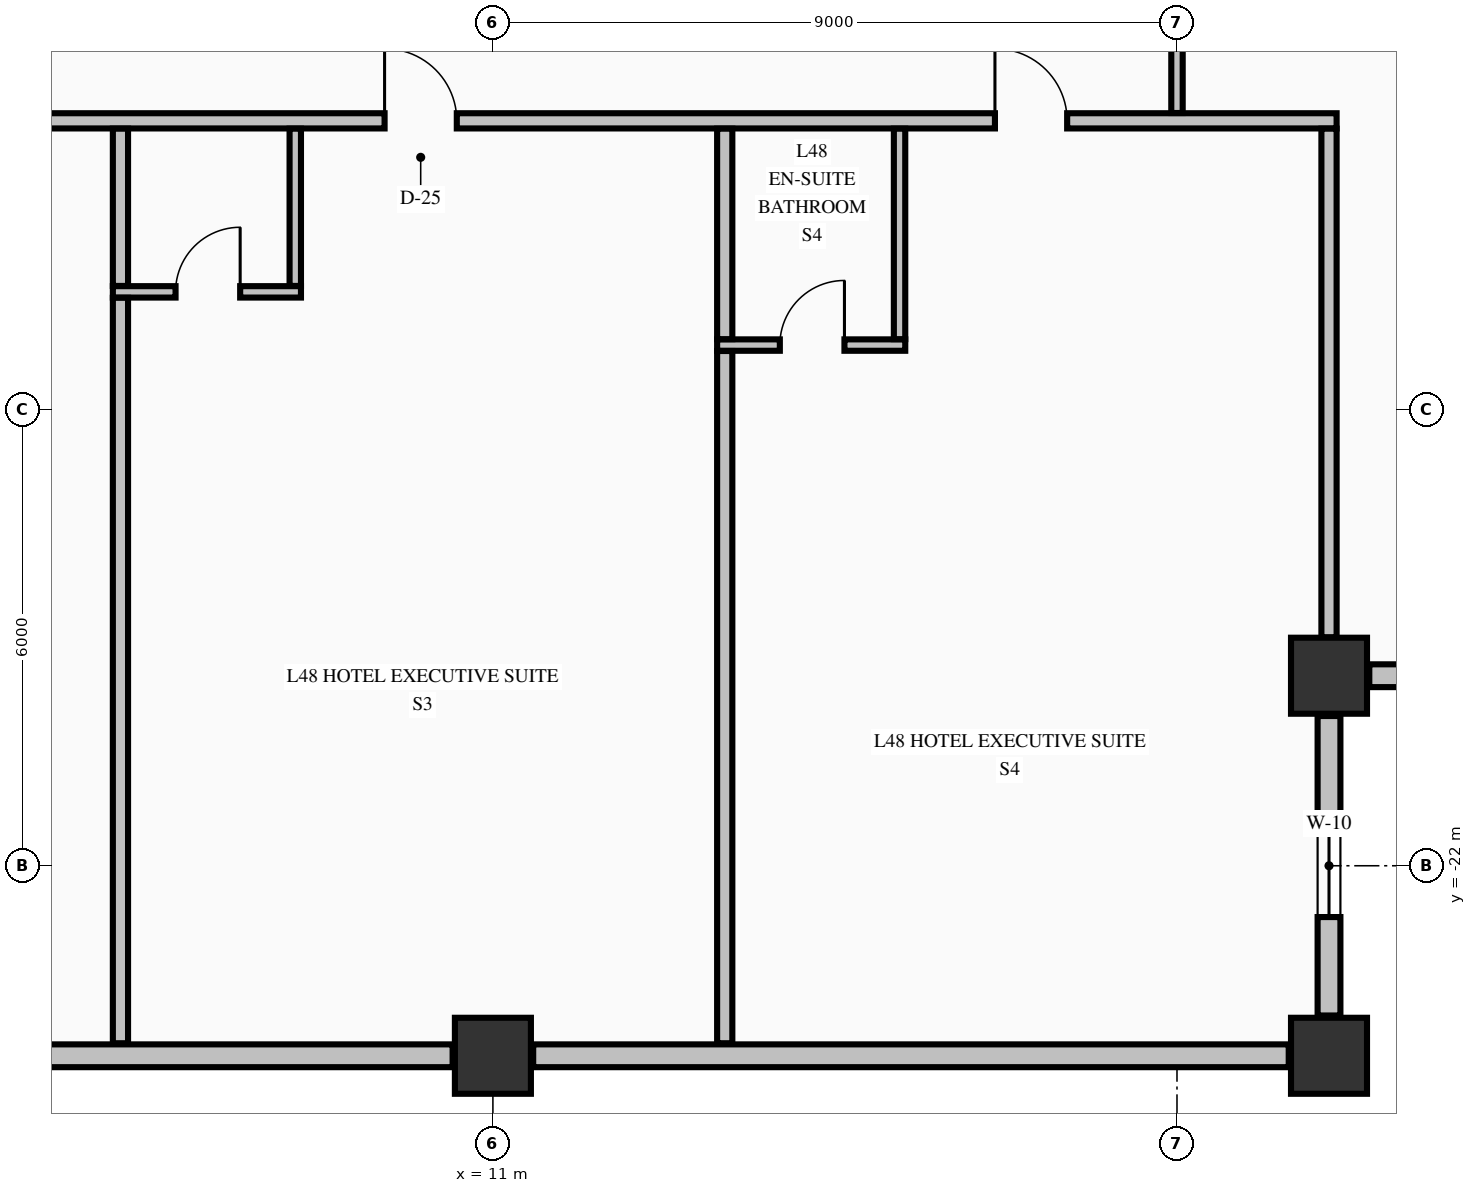
"""IFC4 building model, lengths in metres.
Left out: names, types, materials, properties, quantities, classifications, styles, units other than length and angle.
Written with IfcOpenShell. Run it as: python <this file> out.ifc"""

import sys

from ifc_helpers import new_model, si_unit, direction, frame, frame_2d, origin, origin_2d, place, context, subcontext, project, spatial, rectangle, extrude, element, fill, save


model = new_model("IFC4")
c1 = context("Model", 3, precision=1e-05, world=origin(), true_north=direction((0.0, 1.0)))
c2 = subcontext(c1, "Body", "Model", "MODEL_VIEW")
j1 = project(units=[si_unit("LENGTHUNIT", "METRE"), si_unit("PLANEANGLEUNIT", "RADIAN")], contexts=[c1])
p1 = place(None, origin())
s1 = spatial("IfcSite", under=j1, at=p1, CompositionType="ELEMENT")
p2 = place(p1, origin())
s2 = spatial("IfcBuilding", under=s1, at=p2, CompositionType="ELEMENT")
p3 = place(p2, frame((0.0, 0.0, 186.46)))
s3 = spatial("IfcBuildingStorey", under=s2, at=p3, CompositionType="ELEMENT", Elevation=186.46)
for number, where, z_axis, x_axis in (
    (1, (11.0, -24.5, -0.425), (0.0, 0.0, 1.0), (1.0, 0.0, 0.0)),
    (2, (22.0, -24.5, -0.425), (0.0, 0.0, 1.0), (1.0, 0.0, 0.0)),
    (3, (22.0, -19.5, -0.425), (0.0, 0.0, 1.0), (1.0, 0.0, 0.0)),
):
    element("IfcColumn", number, at=place(p3, frame(where, z_axis=z_axis, x_axis=x_axis)), inside=s3, PredefinedType="COLUMN", context=c2, shape_type="SweptSolid", body=[
        extrude(rectangle(XDim=1.0, YDim=1.0, at=origin_2d()), origin(), (0.0, 0.0, 1.0), 5.0),
    ])
p4 = place(p3, frame((22.0, -23.97, 0.0), z_axis=(0.0, 0.0, 1.0), x_axis=(0.0, 1.0, 0.0)))
e4 = element("IfcWall", 4, at=p4, inside=s3, PredefinedType="STANDARD", context=c2, shape_type="SweptSolid", body=[
    extrude(rectangle(XDim=3.94, YDim=0.3, at=frame_2d((1.97, 0.0))), origin(), (0.0, 0.0, 1.0), 2.767),
])
p5 = place(p4, frame((1.295, 0.0, 0.68)))
e5 = element("IfcOpeningElement", 5, at=p5, cuts=e4, PredefinedType="OPENING", context=c2, shape_type="SweptSolid", body=[
    extrude(rectangle(XDim=1.35, YDim=1.42, at=frame_2d((0.675, 0.71))), frame((0.0, 0.16, 0.0), z_axis=(0.0, -1.0, 0.0), x_axis=(1.0, 0.0, 0.0)), (0.0, 0.0, 1.0), 0.32),
])
p6 = place(p3, frame((22.53, -19.5, 0.0), z_axis=(0.0, 0.0, 1.0), x_axis=(1.0, 0.0, 0.0)))
e6 = element("IfcWall", 6, at=p6, inside=s3, PredefinedType="STANDARD", context=c2, shape_type="SweptSolid", body=[
    extrude(rectangle(XDim=3.94, YDim=0.3, at=frame_2d((1.97, 0.0))), origin(), (0.0, 0.0, 1.0), 2.167),
])
for number, where, z_axis, x_axis in (
    (7, (0.53, -24.5, 0.0), (0.0, 0.0, 1.0), (1.0, 0.0, 0.0)),
    (8, (11.53, -24.5, 0.0), (0.0, 0.0, 1.0), (1.0, 0.0, 0.0)),
):
    element("IfcWall", number, at=place(p3, frame(where, z_axis=z_axis, x_axis=x_axis)), inside=s3, PredefinedType="STANDARD", context=c2, shape_type="SweptSolid", body=[
        extrude(rectangle(XDim=9.94, YDim=0.3, at=frame_2d((4.97, 0.0))), origin(), (0.0, 0.0, 1.0), 2.167),
    ])
p7 = place(p3, frame((13.95, -15.15, 0.0), z_axis=(0.0, 0.0, 1.0), x_axis=(1.0, 0.0, 0.0)))
e9 = element("IfcWall", 9, at=p7, inside=s3, PredefinedType="PARTITIONING", context=c2, shape_type="SweptSolid", body=[
    extrude(rectangle(XDim=2.475, YDim=0.15, at=frame_2d((1.238, 0.0))), origin(), (0.0, 0.0, 1.0), 4.575),
])
p8 = place(p7, frame((0.825, 0.0, 0.0)))
e10 = element("IfcOpeningElement", 10, at=p8, cuts=e9, PredefinedType="OPENING", context=c2, shape_type="SweptSolid", body=[
    extrude(rectangle(XDim=0.85, YDim=2.1, at=frame_2d((0.425, 1.05))), frame((0.0, 0.085, 0.0), z_axis=(0.0, -1.0, 0.0), x_axis=(1.0, 0.0, 0.0)), (0.0, 0.0, 1.0), 0.17),
])
p9 = place(p3, frame((6.0, -14.45, 0.0), z_axis=(0.0, 0.0, 1.0), x_axis=(1.0, 0.0, 0.0)))
e11 = element("IfcWall", 11, at=p9, inside=s3, PredefinedType="PARTITIONING", context=c2, shape_type="SweptSolid", body=[
    extrude(rectangle(XDim=2.475, YDim=0.15, at=frame_2d((1.238, 0.0))), origin(), (0.0, 0.0, 1.0), 4.115),
])
p10 = place(p9, frame((0.825, 0.0, 0.0)))
e12 = element("IfcOpeningElement", 12, at=p10, cuts=e11, PredefinedType="OPENING", context=c2, shape_type="SweptSolid", body=[
    extrude(rectangle(XDim=0.85, YDim=2.1, at=frame_2d((0.425, 1.05))), frame((0.0, 0.085, 0.0), z_axis=(0.0, -1.0, 0.0), x_axis=(1.0, 0.0, 0.0)), (0.0, 0.0, 1.0), 0.17),
])
p11 = place(p3, frame((-17.1, -12.2, 0.0), z_axis=(0.0, 0.0, 1.0), x_axis=(1.0, 0.0, 0.0)))
e13 = element("IfcWall", 13, at=p11, inside=s3, PredefinedType="PARTITIONING", context=c2, shape_type="SweptSolid", body=[
    extrude(rectangle(XDim=39.2, YDim=0.2, at=frame_2d((19.6, 0.0))), origin(), (0.0, 0.0, 1.0), 4.575),
])
p12 = place(p11, frame((8.025, 0.0, 0.0)))
e14 = element("IfcOpeningElement", 14, at=p12, cuts=e13, PredefinedType="OPENING", context=c2, shape_type="SweptSolid", body=[
    extrude(rectangle(XDim=1.05, YDim=2.15, at=frame_2d((0.525, 1.075))), frame((0.0, 0.11, 0.0), z_axis=(0.0, -1.0, 0.0), x_axis=(1.0, 0.0, 0.0)), (0.0, 0.0, 1.0), 0.22),
])
p13 = place(p11, frame((13.675, 0.0, 0.0)))
e15 = element("IfcOpeningElement", 15, at=p13, cuts=e13, PredefinedType="OPENING", context=c2, shape_type="SweptSolid", body=[
    extrude(rectangle(XDim=0.95, YDim=2.15, at=frame_2d((0.475, 1.075))), frame((0.0, 0.11, 0.0), z_axis=(0.0, -1.0, 0.0), x_axis=(1.0, 0.0, 0.0)), (0.0, 0.0, 1.0), 0.22),
])
p14 = place(p11, frame((26.675, 0.0, 0.0)))
e16 = element("IfcOpeningElement", 16, at=p14, cuts=e13, PredefinedType="OPENING", context=c2, shape_type="SweptSolid", body=[
    extrude(rectangle(XDim=0.95, YDim=2.02, at=frame_2d((0.475, 1.01))), frame((0.0, 0.11, 0.0), z_axis=(0.0, -1.0, 0.0), x_axis=(1.0, 0.0, 0.0)), (0.0, 0.0, 1.0), 0.22),
])
p15 = place(p11, frame((34.705, 0.0, 0.0)))
e17 = element("IfcOpeningElement", 17, at=p15, cuts=e13, PredefinedType="OPENING", context=c2, shape_type="SweptSolid", body=[
    extrude(rectangle(XDim=0.95, YDim=2.15, at=frame_2d((0.475, 1.075))), frame((0.0, 0.11, 0.0), z_axis=(0.0, -1.0, 0.0), x_axis=(1.0, 0.0, 0.0)), (0.0, 0.0, 1.0), 0.22),
])
p16 = place(p3, frame((6.1, -24.335, 0.0), z_axis=(0.0, 0.0, 1.0), x_axis=(0.0, 1.0, 0.0)))
e18 = element("IfcWall", 18, at=p16, inside=s3, PredefinedType="PARTITIONING", context=c2, shape_type="SweptSolid", body=[
    extrude(rectangle(XDim=9.807, YDim=0.2, at=frame_2d((4.903, 0.0))), origin(), (0.0, 0.0, 1.0), 4.575),
])
p17 = place(p3, frame((6.1, -14.372, 0.0), z_axis=(0.0, 0.0, 1.0), x_axis=(0.0, 1.0, 0.0)))
e19 = element("IfcWall", 19, at=p17, inside=s3, PredefinedType="PARTITIONING", context=c2, shape_type="SweptSolid", body=[
    extrude(rectangle(XDim=2.069, YDim=0.2, at=frame_2d((1.035, 0.0))), origin(), (0.0, 0.0, 1.0), 4.575),
])
p18 = place(p3, frame((8.4, -14.372, 0.0), z_axis=(0.0, 0.0, 1.0), x_axis=(0.0, 1.0, 0.0)))
e20 = element("IfcWall", 20, at=p18, inside=s3, PredefinedType="PARTITIONING", context=c2, shape_type="SweptSolid", body=[
    extrude(rectangle(XDim=2.069, YDim=0.15, at=frame_2d((1.035, 0.0))), origin(), (0.0, 0.0, 1.0), 4.575),
])
p19 = place(p3, frame((14.05, -24.335, 0.0), z_axis=(0.0, 0.0, 1.0), x_axis=(0.0, 1.0, 0.0)))
e21 = element("IfcWall", 21, at=p19, inside=s3, PredefinedType="PARTITIONING", context=c2, shape_type="SweptSolid", body=[
    extrude(rectangle(XDim=9.107, YDim=0.2, at=frame_2d((4.553, 0.0))), origin(), (0.0, 0.0, 1.0), 4.575),
])
p20 = place(p3, frame((14.05, -15.072, 0.0), z_axis=(0.0, 0.0, 1.0), x_axis=(0.0, 1.0, 0.0)))
e22 = element("IfcWall", 22, at=p20, inside=s3, PredefinedType="PARTITIONING", context=c2, shape_type="SweptSolid", body=[
    extrude(rectangle(XDim=2.769, YDim=0.2, at=frame_2d((1.385, 0.0))), origin(), (0.0, 0.0, 1.0), 4.575),
])
p21 = place(p3, frame((16.35, -15.072, 0.0), z_axis=(0.0, 0.0, 1.0), x_axis=(0.0, 1.0, 0.0)))
e23 = element("IfcWall", 23, at=p21, inside=s3, PredefinedType="PARTITIONING", context=c2, shape_type="SweptSolid", body=[
    extrude(rectangle(XDim=2.769, YDim=0.15, at=frame_2d((1.385, 0.0))), origin(), (0.0, 0.0, 1.0), 4.575),
])
p22 = place(p3, frame((20.0, -12.097, 0.0), z_axis=(0.0, 0.0, 1.0), x_axis=(0.0, 1.0, 0.0)))
e24 = element("IfcWall", 24, at=p22, inside=s3, PredefinedType="PARTITIONING", context=c2, shape_type="SweptSolid", body=[
    extrude(rectangle(XDim=1.716, YDim=0.15, at=frame_2d((0.858, 0.0))), origin(), (0.0, 0.0, 1.0), 3.767),
])
p23 = place(p3, frame((22.0, -18.994, 0.0), z_axis=(0.0, 0.0, 1.0), x_axis=(0.0, 1.0, 0.0)))
e25 = element("IfcWall", 25, at=p23, inside=s3, PredefinedType="PARTITIONING", context=c2, shape_type="SweptSolid", body=[
    extrude(rectangle(XDim=6.691, YDim=0.2, at=frame_2d((3.345, 0.0))), origin(), (0.0, 0.0, 1.0), 2.167),
])
p24 = place(p5, origin())
e26 = element("IfcWindow", 26, at=p24, inside=s3, PartitioningType="SINGLE_PANEL", PredefinedType="WINDOW", context=c2, shape_type="SweptSolid", body=[
    extrude(rectangle(XDim=1.35, YDim=1.42, at=frame_2d((0.675, 0.71))), frame((0.0, 0.03, 0.0), z_axis=(0.0, -1.0, 0.0), x_axis=(1.0, 0.0, 0.0)), (0.0, 0.0, 1.0), 0.06),
])
fill(e5, e26)
p25 = place(p14, origin())
e27 = element("IfcDoor", 27, at=p25, inside=s3, OperationType="SINGLE_SWING_LEFT", PredefinedType="DOOR", context=c2, shape_type="SweptSolid", body=[
    extrude(rectangle(XDim=0.95, YDim=2.02, at=frame_2d((0.475, 1.01))), frame((0.0, 0.025, 0.0), z_axis=(0.0, -1.0, 0.0), x_axis=(1.0, 0.0, 0.0)), (0.0, 0.0, 1.0), 0.05),
])
fill(e16, e27)
p26 = place(p10, origin())
e28 = element("IfcDoor", 28, at=p26, inside=s3, OperationType="SINGLE_SWING_RIGHT", PredefinedType="DOOR", context=c2, shape_type="SweptSolid", body=[
    extrude(rectangle(XDim=0.85, YDim=2.1, at=frame_2d((0.425, 1.05))), frame((0.0, 0.025, 0.0), z_axis=(0.0, -1.0, 0.0), x_axis=(1.0, 0.0, 0.0)), (0.0, 0.0, 1.0), 0.05),
])
fill(e12, e28)
p27 = place(p15, origin())
e29 = element("IfcDoor", 29, at=p27, inside=s3, OperationType="SINGLE_SWING_LEFT", PredefinedType="DOOR", context=c2, shape_type="SweptSolid", body=[
    extrude(rectangle(XDim=0.95, YDim=2.15, at=frame_2d((0.475, 1.075))), frame((0.0, 0.025, 0.0), z_axis=(0.0, -1.0, 0.0), x_axis=(1.0, 0.0, 0.0)), (0.0, 0.0, 1.0), 0.05),
])
fill(e17, e29)
p28 = place(p8, origin())
e30 = element("IfcDoor", 30, at=p28, inside=s3, OperationType="SINGLE_SWING_RIGHT", PredefinedType="DOOR", context=c2, shape_type="SweptSolid", body=[
    extrude(rectangle(XDim=0.85, YDim=2.1, at=frame_2d((0.425, 1.05))), frame((0.0, 0.025, 0.0), z_axis=(0.0, -1.0, 0.0), x_axis=(1.0, 0.0, 0.0)), (0.0, 0.0, 1.0), 0.05),
])
fill(e10, e30)
save(model, sys.argv[1])
